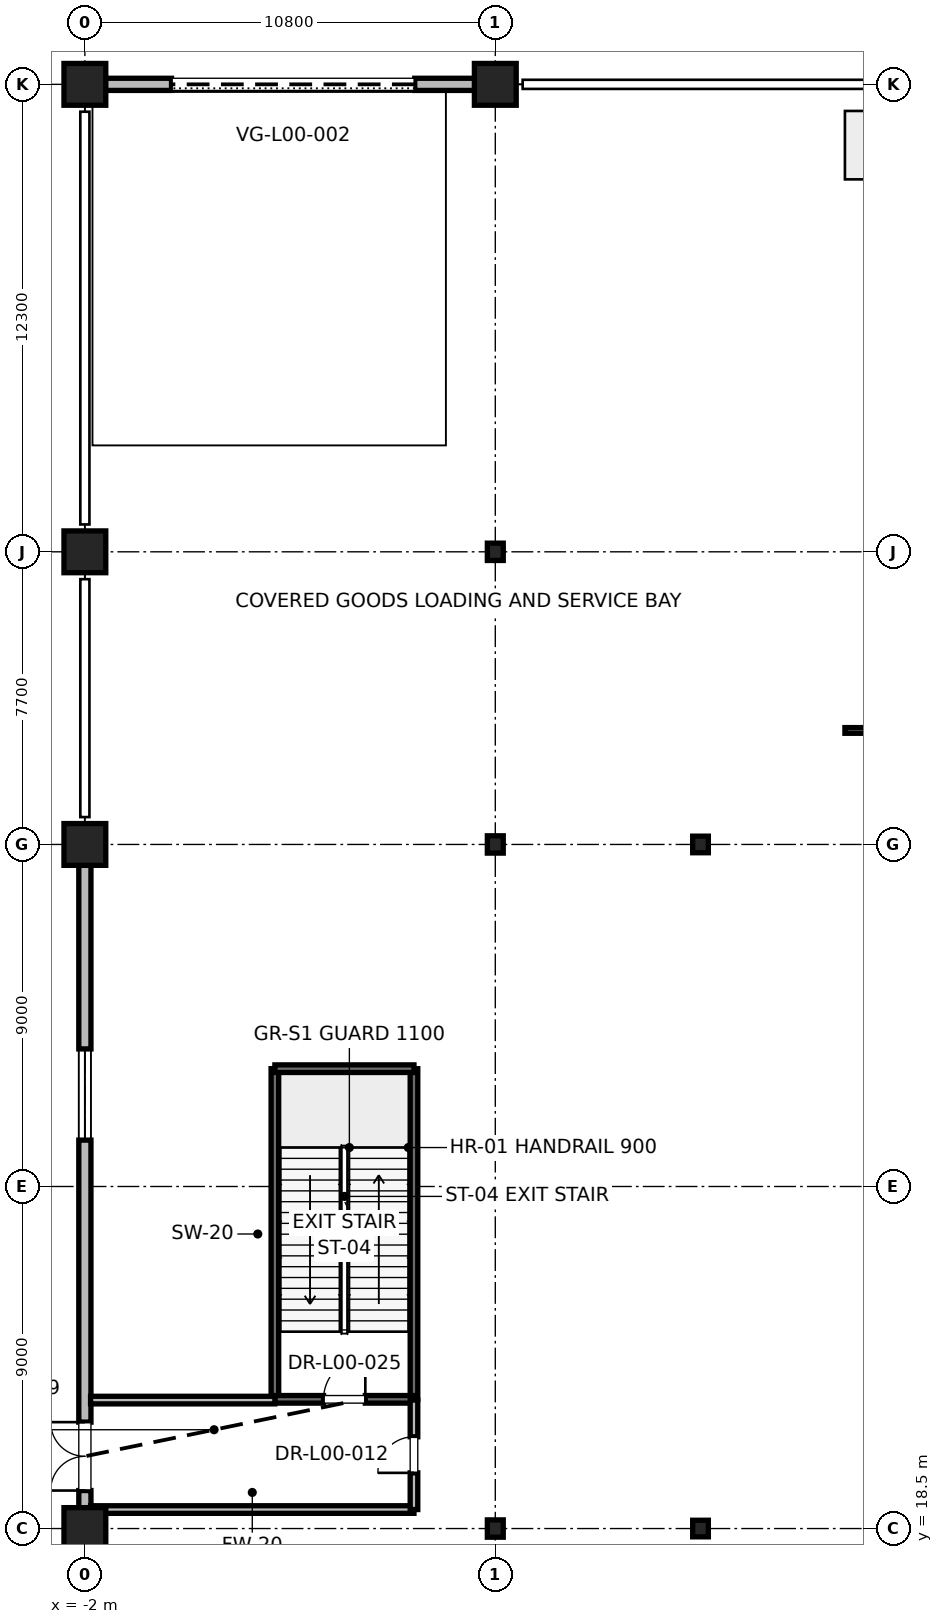
"""IFC4 building model, lengths in metres.
Left out: names, types, materials, properties, quantities, classifications, styles, units other than length and angle.
Written with IfcOpenShell. Run it as: python <this file> out.ifc"""

import sys

from ifc_helpers import new_model, si_unit, direction, frame, frame_2d, origin, origin_2d, place, context, subcontext, project, spatial, rectangle, i_section, extrude, element, fill, save


model = new_model("IFC4")
c1 = context("Model", 3, precision=1e-05, world=origin(), true_north=direction((0.0, 1.0)))
c2 = subcontext(c1, "Body", "Model", "MODEL_VIEW")
j1 = project(units=[si_unit("LENGTHUNIT", "METRE"), si_unit("PLANEANGLEUNIT", "RADIAN")], contexts=[c1])
p1 = place(None, origin())
s1 = spatial("IfcSite", under=j1, at=p1, CompositionType="ELEMENT")
p2 = place(p1, origin())
s2 = spatial("IfcBuilding", under=s1, at=p2, CompositionType="ELEMENT")
p3 = place(p2, origin())
s3 = spatial("IfcBuildingStorey", under=s2, at=p3, CompositionType="ELEMENT", Elevation=0.0)
for number, where, z_axis, x_axis in (
    (1, (14.2, 18.5, 0.0), (0.0, 0.0, 1.0), (1.0, 0.0, 0.0)),
    (2, (14.2, 36.5, 0.0), (0.0, 0.0, 1.0), (1.0, 0.0, 0.0)),
):
    element("IfcColumn", number, at=place(p3, frame(where, z_axis=z_axis, x_axis=x_axis)), inside=s3, PredefinedType="COLUMN", context=c2, shape_type="SweptSolid", body=[
        extrude(i_section(OverallWidth=0.412, OverallDepth=0.437, WebThickness=0.036, FlangeThickness=0.058, FilletRadius=0.015, at=origin_2d()), origin(), (0.0, 0.0, 1.0), 6.0),
    ])
for number, where, z_axis, x_axis in (
    (3, (-2.0, 18.5, 0.0), (0.0, 0.0, 1.0), (1.0, 0.0, 0.0)),
    (4, (-2.0, 36.5, 0.0), (0.0, 0.0, 1.0), (1.0, 0.0, 0.0)),
    (5, (-2.0, 44.2, 0.0), (0.0, 0.0, 1.0), (1.0, 0.0, 0.0)),
    (6, (-2.0, 56.5, 0.0), (0.0, 0.0, 1.0), (1.0, 0.0, 0.0)),
    (7, (8.8, 56.5, 0.0), (0.0, 0.0, 1.0), (1.0, 0.0, 0.0)),
):
    element("IfcColumn", number, at=place(p3, frame(where, z_axis=z_axis, x_axis=x_axis)), inside=s3, PredefinedType="COLUMN", context=c2, shape_type="SweptSolid", body=[
        extrude(rectangle(XDim=1.1, YDim=1.1, at=origin_2d()), origin(), (0.0, 0.0, 1.0), 6.0),
    ])
for number, where, z_axis, x_axis in (
    (8, (8.8, 18.5, 0.0), (0.0, 0.0, 1.0), (1.0, 0.0, 0.0)),
    (9, (8.8, 36.5, 0.0), (0.0, 0.0, 1.0), (1.0, 0.0, 0.0)),
    (10, (8.8, 44.2, 0.0), (0.0, 0.0, 1.0), (1.0, 0.0, 0.0)),
):
    element("IfcColumn", number, at=place(p3, frame(where, z_axis=z_axis, x_axis=x_axis)), inside=s3, PredefinedType="COLUMN", context=c2, shape_type="SweptSolid", body=[
        extrude(i_section(OverallWidth=0.418, OverallDepth=0.456, WebThickness=0.042, FlangeThickness=0.067, FilletRadius=0.015, at=origin_2d()), origin(), (0.0, 0.0, 1.0), 6.0),
    ])
p4 = place(p3, frame((8.26, 56.5, 0.0), z_axis=(0.0, 0.0, 1.0), x_axis=(-1.0, 0.0, 0.0)))
e11 = element("IfcWall", 11, at=p4, inside=s3, PredefinedType="SOLIDWALL", context=c2, shape_type="SweptSolid", body=[
    extrude(rectangle(XDim=9.72, YDim=0.32, at=frame_2d((4.86, 0.0))), origin(), (0.0, 0.0, 1.0), 4.759),
])
p5 = place(p4, frame((1.58, 0.0, 0.0)))
e12 = element("IfcOpeningElement", 12, at=p5, cuts=e11, PredefinedType="OPENING", context=c2, shape_type="SweptSolid", body=[
    extrude(rectangle(XDim=6.4, YDim=4.1, at=frame_2d((3.2, 2.05))), frame((0.0, 0.16, 0.0), z_axis=(0.0, -1.0, 0.0), x_axis=(1.0, 0.0, 0.0)), (0.0, 0.0, 1.0), 0.32),
])
p6 = place(p3, frame((-2.0, 19.04, 0.0), z_axis=(0.0, 0.0, 1.0), x_axis=(0.0, 1.0, 0.0)))
e13 = element("IfcWall", 13, at=p6, inside=s3, PredefinedType="SOLIDWALL", context=c2, shape_type="SweptSolid", body=[
    extrude(rectangle(XDim=16.92, YDim=0.32, at=frame_2d((8.46, 0.0))), origin(), (0.0, 0.0, 1.0), 4.759),
])
p7 = place(p6, frame((0.46, 0.0, 0.0)))
e14 = element("IfcOpeningElement", 14, at=p7, cuts=e13, PredefinedType="OPENING", context=c2, shape_type="SweptSolid", body=[
    extrude(rectangle(XDim=1.8, YDim=2.4, at=frame_2d((0.9, 1.2))), frame((0.0, 0.16, 0.0), z_axis=(0.0, -1.0, 0.0), x_axis=(1.0, 0.0, 0.0)), (0.0, 0.0, 1.0), 0.32),
])
p8 = place(p6, frame((9.68, 0.0, 0.9)))
e15 = element("IfcOpeningElement", 15, at=p8, cuts=e13, PredefinedType="OPENING", context=c2, shape_type="SweptSolid", body=[
    extrude(rectangle(XDim=2.4, YDim=2.4, at=frame_2d((1.2, 1.2))), frame((0.0, 0.16, 0.0), z_axis=(0.0, -1.0, 0.0), x_axis=(1.0, 0.0, 0.0)), (0.0, 0.0, 1.0), 0.32),
])
for number, where, z_axis, x_axis in (
    (16, (3.0, 21.9, 0.0), (0.0, 0.0, 1.0), (0.0, 1.0, 0.0)),
    (17, (6.66, 21.9, 0.0), (0.0, 0.0, 1.0), (0.0, 1.0, 0.0)),
):
    element("IfcWall", number, at=place(p3, frame(where, z_axis=z_axis, x_axis=x_axis)), inside=s3, PredefinedType="SOLIDWALL", context=c2, shape_type="SweptSolid", body=[
        extrude(rectangle(XDim=8.7, YDim=0.2, at=frame_2d((4.35, 0.0))), origin(), (0.0, 0.0, 1.0), 5.72),
    ])
p9 = place(p3, frame((3.0, 30.6, 0.0), z_axis=(0.0, 0.0, 1.0), x_axis=(1.0, 0.0, 0.0)))
e18 = element("IfcWall", 18, at=p9, inside=s3, PredefinedType="SOLIDWALL", context=c2, shape_type="SweptSolid", body=[
    extrude(rectangle(XDim=3.66, YDim=0.2, at=frame_2d((1.83, 0.0))), origin(), (0.0, 0.0, 1.0), 5.72),
])
p10 = place(p3, frame((3.0, 21.9, 0.0), z_axis=(0.0, 0.0, 1.0), x_axis=(1.0, 0.0, 0.0)))
e19 = element("IfcWall", 19, at=p10, inside=s3, PredefinedType="SOLIDWALL", context=c2, shape_type="SweptSolid", body=[
    extrude(rectangle(XDim=3.66, YDim=0.2, at=frame_2d((1.83, 0.0))), origin(), (0.0, 0.0, 1.0), 5.72),
])
p11 = place(p10, frame((1.28, 0.0, 0.0)))
e20 = element("IfcOpeningElement", 20, at=p11, cuts=e19, PredefinedType="OPENING", context=c2, shape_type="SweptSolid", body=[
    extrude(rectangle(XDim=1.1, YDim=2.15, at=frame_2d((0.55, 1.075))), frame((0.0, 0.1, 0.0), z_axis=(0.0, -1.0, 0.0), x_axis=(1.0, 0.0, 0.0)), (0.0, 0.0, 1.0), 0.2),
])
p12 = place(p3, frame((-1.85, 19.0, 0.0), z_axis=(0.0, 0.0, 1.0), x_axis=(1.0, 0.0, 0.0)))
e21 = element("IfcWall", 21, at=p12, inside=s3, PredefinedType="PARTITIONING", context=c2, shape_type="SweptSolid", body=[
    extrude(rectangle(XDim=8.51, YDim=0.2, at=frame_2d((4.255, 0.0))), origin(), (0.0, 0.0, 1.0), 2.85),
])
p13 = place(p3, frame((-1.85, 21.88, 0.0), z_axis=(0.0, 0.0, 1.0), x_axis=(1.0, 0.0, 0.0)))
e22 = element("IfcWall", 22, at=p13, inside=s3, PredefinedType="PARTITIONING", context=c2, shape_type="SweptSolid", body=[
    extrude(rectangle(XDim=4.85, YDim=0.2, at=frame_2d((2.425, 0.0))), origin(), (0.0, 0.0, 1.0), 2.85),
])
p14 = place(p3, frame((6.66, 19.0, 0.0), z_axis=(0.0, 0.0, 1.0), x_axis=(0.0, 1.0, 0.0)))
e23 = element("IfcWall", 23, at=p14, inside=s3, PredefinedType="PARTITIONING", context=c2, shape_type="SweptSolid", body=[
    extrude(rectangle(XDim=2.88, YDim=0.2, at=frame_2d((1.44, 0.0))), origin(), (0.0, 0.0, 1.0), 2.85),
])
p15 = place(p14, frame((0.965, 0.0, 0.0)))
e24 = element("IfcOpeningElement", 24, at=p15, cuts=e23, PredefinedType="OPENING", context=c2, shape_type="SweptSolid", body=[
    extrude(rectangle(XDim=0.95, YDim=2.15, at=frame_2d((0.475, 1.075))), frame((0.0, 0.1, 0.0), z_axis=(0.0, -1.0, 0.0), x_axis=(1.0, 0.0, 0.0)), (0.0, 0.0, 1.0), 0.2),
])
p16 = place(p3, frame((18.0, 39.5, 0.0), z_axis=(0.0, 0.0, 1.0), x_axis=(1.0, 0.0, 0.0)))
e25 = element("IfcWall", 25, at=p16, inside=s3, PredefinedType="PARTITIONING", context=c2, shape_type="SweptSolid", body=[
    extrude(rectangle(XDim=10.6, YDim=0.15, at=frame_2d((5.3, 0.0))), origin(), (0.0, 0.0, 1.0), 2.85),
])
p17 = place(p16, frame((4.75, 0.0, 0.0)))
e26 = element("IfcOpeningElement", 26, at=p17, cuts=e25, PredefinedType="OPENING", context=c2, shape_type="SweptSolid", body=[
    extrude(rectangle(XDim=1.1, YDim=2.15, at=frame_2d((0.55, 1.075))), frame((0.0, 0.075, 0.0), z_axis=(0.0, -1.0, 0.0), x_axis=(1.0, 0.0, 0.0)), (0.0, 0.0, 1.0), 0.15),
])
p18 = place(p5, origin())
e27 = element("IfcDoor", 27, at=p18, inside=s3, OperationType="ROLLINGUP", PredefinedType="GATE", context=c2, shape_type="SweptSolid", body=[
    extrude(rectangle(XDim=6.4, YDim=4.1, at=frame_2d((3.2, 2.05))), frame((0.0, 0.025, 0.0), z_axis=(0.0, -1.0, 0.0), x_axis=(1.0, 0.0, 0.0)), (0.0, 0.0, 1.0), 0.05),
])
fill(e12, e27)
p19 = place(p7, origin())
e28 = element("IfcDoor", 28, at=p19, inside=s3, OperationType="DOUBLE_DOOR_SINGLE_SWING", PredefinedType="DOOR", context=c2, shape_type="SweptSolid", body=[
    extrude(rectangle(XDim=1.8, YDim=2.4, at=frame_2d((0.9, 1.2))), frame((0.0, 0.025, 0.0), z_axis=(0.0, -1.0, 0.0), x_axis=(1.0, 0.0, 0.0)), (0.0, 0.0, 1.0), 0.05),
])
fill(e14, e28)
p20 = place(p8, origin())
e29 = element("IfcWindow", 29, at=p20, inside=s3, PartitioningType="SINGLE_PANEL", PredefinedType="WINDOW", context=c2, shape_type="SweptSolid", body=[
    extrude(rectangle(XDim=2.4, YDim=2.4, at=frame_2d((1.2, 1.2))), frame((0.0, 0.03, 0.0), z_axis=(0.0, -1.0, 0.0), x_axis=(1.0, 0.0, 0.0)), (0.0, 0.0, 1.0), 0.06),
])
fill(e15, e29)
p21 = place(p11, origin())
e30 = element("IfcDoor", 30, at=p21, inside=s3, OperationType="SINGLE_SWING_RIGHT", PredefinedType="DOOR", context=c2, shape_type="SweptSolid", body=[
    extrude(rectangle(XDim=1.1, YDim=2.15, at=frame_2d((0.55, 1.075))), frame((0.0, 0.025, 0.0), z_axis=(0.0, -1.0, 0.0), x_axis=(1.0, 0.0, 0.0)), (0.0, 0.0, 1.0), 0.05),
])
fill(e20, e30)
p22 = place(p15, origin())
e31 = element("IfcDoor", 31, at=p22, inside=s3, OperationType="SINGLE_SWING_LEFT", PredefinedType="DOOR", context=c2, shape_type="SweptSolid", body=[
    extrude(rectangle(XDim=0.95, YDim=2.15, at=frame_2d((0.475, 1.075))), frame((0.0, 0.025, 0.0), z_axis=(0.0, -1.0, 0.0), x_axis=(1.0, 0.0, 0.0)), (0.0, 0.0, 1.0), 0.05),
])
fill(e24, e31)
save(model, sys.argv[1])
